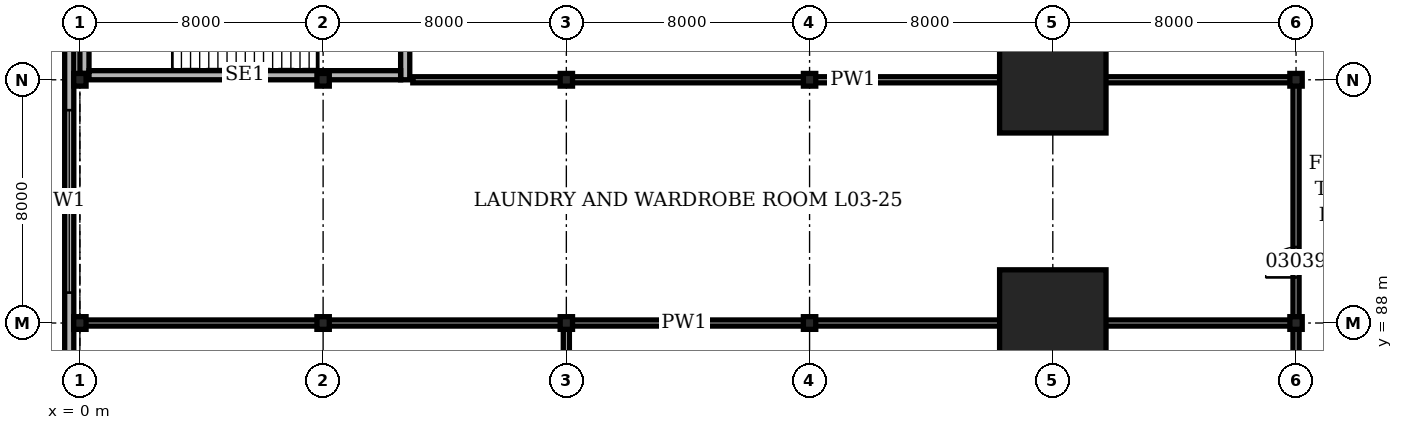
"""IFC4 building model, lengths in metres.
Left out: names, types, materials, properties, quantities, classifications, styles, units other than length and angle.
Written with IfcOpenShell. Run it as: python <this file> out.ifc"""

import sys

from ifc_helpers import new_model, si_unit, direction, frame, frame_2d, origin, origin_2d, place, context, subcontext, project, spatial, rectangle, hollow_rectangle, i_section, extrude, element, fill, save


model = new_model("IFC4")
c1 = context("Model", 3, precision=1e-05, world=origin(), true_north=direction((0.0, 1.0)))
c2 = subcontext(c1, "Body", "Model", "MODEL_VIEW")
j1 = project(units=[si_unit("LENGTHUNIT", "METRE"), si_unit("PLANEANGLEUNIT", "RADIAN")], contexts=[c1])
p1 = place(None, origin())
s1 = spatial("IfcSite", under=j1, at=p1, CompositionType="ELEMENT")
p2 = place(p1, origin())
s2 = spatial("IfcBuilding", under=s1, at=p2, CompositionType="ELEMENT")
p3 = place(p2, frame((0.0, 0.0, 14.9)))
s3 = spatial("IfcBuildingStorey", under=s2, at=p3, CompositionType="ELEMENT", Elevation=14.9)
for number, where, z_axis, x_axis in (
    (1, (0.0, 88.0, 0.0), (0.0, 0.0, 1.0), (1.0, 0.0, 0.0)),
    (2, (0.0, 96.0, 0.0), (0.0, 0.0, 1.0), (1.0, 0.0, 0.0)),
    (3, (8.0, 88.0, 0.0), (0.0, 0.0, 1.0), (1.0, 0.0, 0.0)),
    (4, (8.0, 96.0, 0.0), (0.0, 0.0, 1.0), (1.0, 0.0, 0.0)),
    (5, (16.0, 88.0, 0.0), (0.0, 0.0, 1.0), (1.0, 0.0, 0.0)),
    (6, (16.0, 96.0, 0.0), (0.0, 0.0, 1.0), (1.0, 0.0, 0.0)),
    (7, (24.0, 88.0, 0.0), (0.0, 0.0, 1.0), (1.0, 0.0, 0.0)),
    (8, (24.0, 96.0, 0.0), (0.0, 0.0, 1.0), (1.0, 0.0, 0.0)),
):
    element("IfcColumn", number, at=place(p3, frame(where, z_axis=z_axis, x_axis=x_axis)), inside=s3, PredefinedType="COLUMN", context=c2, shape_type="SweptSolid", body=[
        extrude(i_section(OverallWidth=0.406, OverallDepth=0.417, WebThickness=0.03, FlangeThickness=0.048, at=origin_2d()), origin(), (0.0, 0.0, 1.0), 5.0),
    ])
for number, where, z_axis, x_axis in (
    (9, (32.0, 88.0, 0.0), (0.0, 0.0, 1.0), (1.0, 0.0, 0.0)),
    (10, (32.0, 96.0, 0.0), (0.0, 0.0, 1.0), (1.0, 0.0, 0.0)),
):
    element("IfcColumn", number, at=place(p3, frame(where, z_axis=z_axis, x_axis=x_axis)), inside=s3, PredefinedType="COLUMN", context=c2, shape_type="SweptSolid", body=[
        extrude(hollow_rectangle(XDim=3.5, YDim=3.5, WallThickness=0.5, at=origin_2d()), origin(), (0.0, 0.0, 1.0), 5.0),
    ])
for number, where, z_axis, x_axis in (
    (11, (40.0, 88.0, 0.0), (0.0, 0.0, 1.0), (1.0, 0.0, 0.0)),
    (12, (40.0, 96.0, 0.0), (0.0, 0.0, 1.0), (1.0, 0.0, 0.0)),
):
    element("IfcColumn", number, at=place(p3, frame(where, z_axis=z_axis, x_axis=x_axis)), inside=s3, PredefinedType="COLUMN", context=c2, shape_type="SweptSolid", body=[
        extrude(i_section(OverallWidth=0.406, OverallDepth=0.417, WebThickness=0.03, FlangeThickness=0.048, at=origin_2d()), origin(), (0.0, 0.0, 1.0), 5.0),
    ])
p4 = place(p3, frame((-0.35, 112.35, 0.0), z_axis=(0.0, 0.0, 1.0), x_axis=(0.0, -1.0, 0.0)))
e13 = element("IfcWall", 13, at=p4, inside=s3, PredefinedType="SOLIDWALL", context=c2, shape_type="SweptSolid", body=[
    extrude(rectangle(XDim=112.7, YDim=0.3, at=frame_2d((56.35, 0.0))), origin(), (0.0, 0.0, 1.0), 5.0),
])
p5 = place(p4, frame((1.35, 0.0, 1.0)))
e14 = element("IfcOpeningElement", 14, at=p5, cuts=e13, PredefinedType="OPENING", context=c2, shape_type="SweptSolid", body=[
    extrude(rectangle(XDim=6.0, YDim=1.5, at=frame_2d((3.0, 0.75))), frame((0.0, 0.16, 0.0), z_axis=(0.0, -1.0, 0.0), x_axis=(1.0, 0.0, 0.0)), (0.0, 0.0, 1.0), 0.32),
])
p6 = place(p4, frame((9.35, 0.0, 1.0)))
e15 = element("IfcOpeningElement", 15, at=p6, cuts=e13, PredefinedType="OPENING", context=c2, shape_type="SweptSolid", body=[
    extrude(rectangle(XDim=6.0, YDim=1.5, at=frame_2d((3.0, 0.75))), frame((0.0, 0.16, 0.0), z_axis=(0.0, -1.0, 0.0), x_axis=(1.0, 0.0, 0.0)), (0.0, 0.0, 1.0), 0.32),
])
p7 = place(p4, frame((17.35, 0.0, 1.0)))
e16 = element("IfcOpeningElement", 16, at=p7, cuts=e13, PredefinedType="OPENING", context=c2, shape_type="SweptSolid", body=[
    extrude(rectangle(XDim=6.0, YDim=1.5, at=frame_2d((3.0, 0.75))), frame((0.0, 0.16, 0.0), z_axis=(0.0, -1.0, 0.0), x_axis=(1.0, 0.0, 0.0)), (0.0, 0.0, 1.0), 0.32),
])
p8 = place(p4, frame((25.35, 0.0, 1.0)))
e17 = element("IfcOpeningElement", 17, at=p8, cuts=e13, PredefinedType="OPENING", context=c2, shape_type="SweptSolid", body=[
    extrude(rectangle(XDim=6.0, YDim=1.5, at=frame_2d((3.0, 0.75))), frame((0.0, 0.16, 0.0), z_axis=(0.0, -1.0, 0.0), x_axis=(1.0, 0.0, 0.0)), (0.0, 0.0, 1.0), 0.32),
])
p9 = place(p4, frame((33.35, 0.0, 1.0)))
e18 = element("IfcOpeningElement", 18, at=p9, cuts=e13, PredefinedType="OPENING", context=c2, shape_type="SweptSolid", body=[
    extrude(rectangle(XDim=6.0, YDim=1.5, at=frame_2d((3.0, 0.75))), frame((0.0, 0.16, 0.0), z_axis=(0.0, -1.0, 0.0), x_axis=(1.0, 0.0, 0.0)), (0.0, 0.0, 1.0), 0.32),
])
p10 = place(p4, frame((41.35, 0.0, 1.0)))
e19 = element("IfcOpeningElement", 19, at=p10, cuts=e13, PredefinedType="OPENING", context=c2, shape_type="SweptSolid", body=[
    extrude(rectangle(XDim=6.0, YDim=1.5, at=frame_2d((3.0, 0.75))), frame((0.0, 0.16, 0.0), z_axis=(0.0, -1.0, 0.0), x_axis=(1.0, 0.0, 0.0)), (0.0, 0.0, 1.0), 0.32),
])
p11 = place(p4, frame((49.35, 0.0, 1.0)))
e20 = element("IfcOpeningElement", 20, at=p11, cuts=e13, PredefinedType="OPENING", context=c2, shape_type="SweptSolid", body=[
    extrude(rectangle(XDim=6.0, YDim=1.5, at=frame_2d((3.0, 0.75))), frame((0.0, 0.16, 0.0), z_axis=(0.0, -1.0, 0.0), x_axis=(1.0, 0.0, 0.0)), (0.0, 0.0, 1.0), 0.32),
])
p12 = place(p4, frame((57.35, 0.0, 1.0)))
e21 = element("IfcOpeningElement", 21, at=p12, cuts=e13, PredefinedType="OPENING", context=c2, shape_type="SweptSolid", body=[
    extrude(rectangle(XDim=6.0, YDim=1.5, at=frame_2d((3.0, 0.75))), frame((0.0, 0.16, 0.0), z_axis=(0.0, -1.0, 0.0), x_axis=(1.0, 0.0, 0.0)), (0.0, 0.0, 1.0), 0.32),
])
p13 = place(p4, frame((65.35, 0.0, 1.0)))
e22 = element("IfcOpeningElement", 22, at=p13, cuts=e13, PredefinedType="OPENING", context=c2, shape_type="SweptSolid", body=[
    extrude(rectangle(XDim=6.0, YDim=1.5, at=frame_2d((3.0, 0.75))), frame((0.0, 0.16, 0.0), z_axis=(0.0, -1.0, 0.0), x_axis=(1.0, 0.0, 0.0)), (0.0, 0.0, 1.0), 0.32),
])
p14 = place(p4, frame((73.35, 0.0, 1.0)))
e23 = element("IfcOpeningElement", 23, at=p14, cuts=e13, PredefinedType="OPENING", context=c2, shape_type="SweptSolid", body=[
    extrude(rectangle(XDim=6.0, YDim=1.5, at=frame_2d((3.0, 0.75))), frame((0.0, 0.16, 0.0), z_axis=(0.0, -1.0, 0.0), x_axis=(1.0, 0.0, 0.0)), (0.0, 0.0, 1.0), 0.32),
])
p15 = place(p4, frame((81.35, 0.0, 1.0)))
e24 = element("IfcOpeningElement", 24, at=p15, cuts=e13, PredefinedType="OPENING", context=c2, shape_type="SweptSolid", body=[
    extrude(rectangle(XDim=6.0, YDim=1.5, at=frame_2d((3.0, 0.75))), frame((0.0, 0.16, 0.0), z_axis=(0.0, -1.0, 0.0), x_axis=(1.0, 0.0, 0.0)), (0.0, 0.0, 1.0), 0.32),
])
p16 = place(p4, frame((89.35, 0.0, 1.0)))
e25 = element("IfcOpeningElement", 25, at=p16, cuts=e13, PredefinedType="OPENING", context=c2, shape_type="SweptSolid", body=[
    extrude(rectangle(XDim=6.0, YDim=1.5, at=frame_2d((3.0, 0.75))), frame((0.0, 0.16, 0.0), z_axis=(0.0, -1.0, 0.0), x_axis=(1.0, 0.0, 0.0)), (0.0, 0.0, 1.0), 0.32),
])
p17 = place(p4, frame((97.35, 0.0, 1.0)))
e26 = element("IfcOpeningElement", 26, at=p17, cuts=e13, PredefinedType="OPENING", context=c2, shape_type="SweptSolid", body=[
    extrude(rectangle(XDim=6.0, YDim=1.5, at=frame_2d((3.0, 0.75))), frame((0.0, 0.16, 0.0), z_axis=(0.0, -1.0, 0.0), x_axis=(1.0, 0.0, 0.0)), (0.0, 0.0, 1.0), 0.32),
])
p18 = place(p4, frame((105.35, 0.0, 1.0)))
e27 = element("IfcOpeningElement", 27, at=p18, cuts=e13, PredefinedType="OPENING", context=c2, shape_type="SweptSolid", body=[
    extrude(rectangle(XDim=6.0, YDim=1.5, at=frame_2d((3.0, 0.75))), frame((0.0, 0.16, 0.0), z_axis=(0.0, -1.0, 0.0), x_axis=(1.0, 0.0, 0.0)), (0.0, 0.0, 1.0), 0.32),
])
p19 = place(p3, frame((0.15, 96.208, 0.0), z_axis=(0.0, 0.0, 1.0), x_axis=(0.0, 1.0, 0.0)))
e28 = element("IfcWall", 28, at=p19, inside=s3, PredefinedType="SOLIDWALL", context=c2, shape_type="SweptSolid", body=[
    extrude(rectangle(XDim=7.583, YDim=0.3, at=frame_2d((3.792, 0.0))), origin(), (0.0, 0.0, 1.0), 4.8),
])
p20 = place(p3, frame((10.7, 96.0, 0.0), z_axis=(0.0, 0.0, 1.0), x_axis=(0.0, 1.0, 0.0)))
e29 = element("IfcWall", 29, at=p20, inside=s3, PredefinedType="SOLIDWALL", context=c2, shape_type="SweptSolid", body=[
    extrude(rectangle(XDim=8.0, YDim=0.3, at=frame_2d((4.0, 0.0))), origin(), (0.0, 0.0, 1.0), 4.8),
])
p21 = place(p20, frame((1.1, 0.0, 0.0)))
e30 = element("IfcOpeningElement", 30, at=p21, cuts=e29, PredefinedType="OPENING", context=c2, shape_type="SweptSolid", body=[
    extrude(rectangle(XDim=1.8, YDim=2.1, at=frame_2d((0.9, 1.05))), frame((0.0, 0.16, 0.0), z_axis=(0.0, -1.0, 0.0), x_axis=(1.0, 0.0, 0.0)), (0.0, 0.0, 1.0), 0.32),
])
p22 = place(p3, frame((0.3, 96.15, 0.0), z_axis=(0.0, 0.0, 1.0), x_axis=(1.0, 0.0, 0.0)))
e31 = element("IfcWall", 31, at=p22, inside=s3, PredefinedType="SOLIDWALL", context=c2, shape_type="SweptSolid", body=[
    extrude(rectangle(XDim=10.25, YDim=0.3, at=frame_2d((5.125, 0.0))), origin(), (0.0, 0.0, 1.0), 4.8),
])
p23 = place(p3, frame((-0.15, 88.0, 0.0), z_axis=(0.0, 0.0, 1.0), x_axis=(1.0, 0.0, 0.0)))
e32 = element("IfcWall", 32, at=p23, inside=s3, PredefinedType="PARTITIONING", context=c2, shape_type="SweptSolid", body=[
    extrude(rectangle(XDim=40.05, YDim=0.2, at=frame_2d((20.025, 0.0))), origin(), (0.0, 0.0, 1.0), 4.028),
])
p24 = place(p3, frame((10.95, 96.0, 0.0), z_axis=(0.0, 0.0, 1.0), x_axis=(1.0, 0.0, 0.0)))
e33 = element("IfcWall", 33, at=p24, inside=s3, PredefinedType="PARTITIONING", context=c2, shape_type="SweptSolid", body=[
    extrude(rectangle(XDim=28.95, YDim=0.2, at=frame_2d((14.475, 0.0))), origin(), (0.0, 0.0, 1.0), 4.028),
])
for number, where, z_axis, x_axis in (
    (34, (16.0, 72.1, 0.0), (0.0, 0.0, 1.0), (0.0, 1.0, 0.0)),
    (35, (32.0, 72.1, 0.0), (0.0, 0.0, 1.0), (0.0, 1.0, 0.0)),
):
    element("IfcWall", number, at=place(p3, frame(where, z_axis=z_axis, x_axis=x_axis)), inside=s3, PredefinedType="PARTITIONING", context=c2, shape_type="SweptSolid", body=[
        extrude(rectangle(XDim=15.8, YDim=0.2, at=frame_2d((7.9, 0.0))), origin(), (0.0, 0.0, 1.0), 4.028),
    ])
p25 = place(p3, frame((40.0, 72.1, 0.0), z_axis=(0.0, 0.0, 1.0), x_axis=(0.0, 1.0, 0.0)))
e36 = element("IfcWall", 36, at=p25, inside=s3, PredefinedType="PARTITIONING", context=c2, shape_type="SweptSolid", body=[
    extrude(rectangle(XDim=23.8, YDim=0.2, at=frame_2d((11.9, 0.0))), origin(), (0.0, 0.0, 1.0), 4.028),
])
p26 = place(p25, frame((17.4, 0.0, 0.0)))
e37 = element("IfcOpeningElement", 37, at=p26, cuts=e36, PredefinedType="OPENING", context=c2, shape_type="SweptSolid", body=[
    extrude(rectangle(XDim=1.0, YDim=2.1, at=frame_2d((0.5, 1.05))), frame((0.0, 0.11, 0.0), z_axis=(0.0, -1.0, 0.0), x_axis=(1.0, 0.0, 0.0)), (0.0, 0.0, 1.0), 0.22),
])
p27 = place(p7, origin())
e38 = element("IfcWindow", 38, at=p27, inside=s3, PartitioningType="SINGLE_PANEL", PredefinedType="WINDOW", context=c2, shape_type="SweptSolid", body=[
    extrude(rectangle(XDim=6.0, YDim=1.5, at=frame_2d((3.0, 0.75))), frame((0.0, 0.03, 0.0), z_axis=(0.0, -1.0, 0.0), x_axis=(1.0, 0.0, 0.0)), (0.0, 0.0, 1.0), 0.06),
])
fill(e16, e38)
p28 = place(p26, origin())
e39 = element("IfcDoor", 39, at=p28, inside=s3, OperationType="SINGLE_SWING_LEFT", PredefinedType="DOOR", context=c2, shape_type="SweptSolid", body=[
    extrude(rectangle(XDim=1.0, YDim=2.1, at=frame_2d((0.5, 1.05))), frame((0.0, 0.1, 0.0), z_axis=(0.0, -1.0, 0.0), x_axis=(1.0, 0.0, 0.0)), (0.0, 0.0, 1.0), 0.199),
])
fill(e37, e39)
save(model, sys.argv[1])
